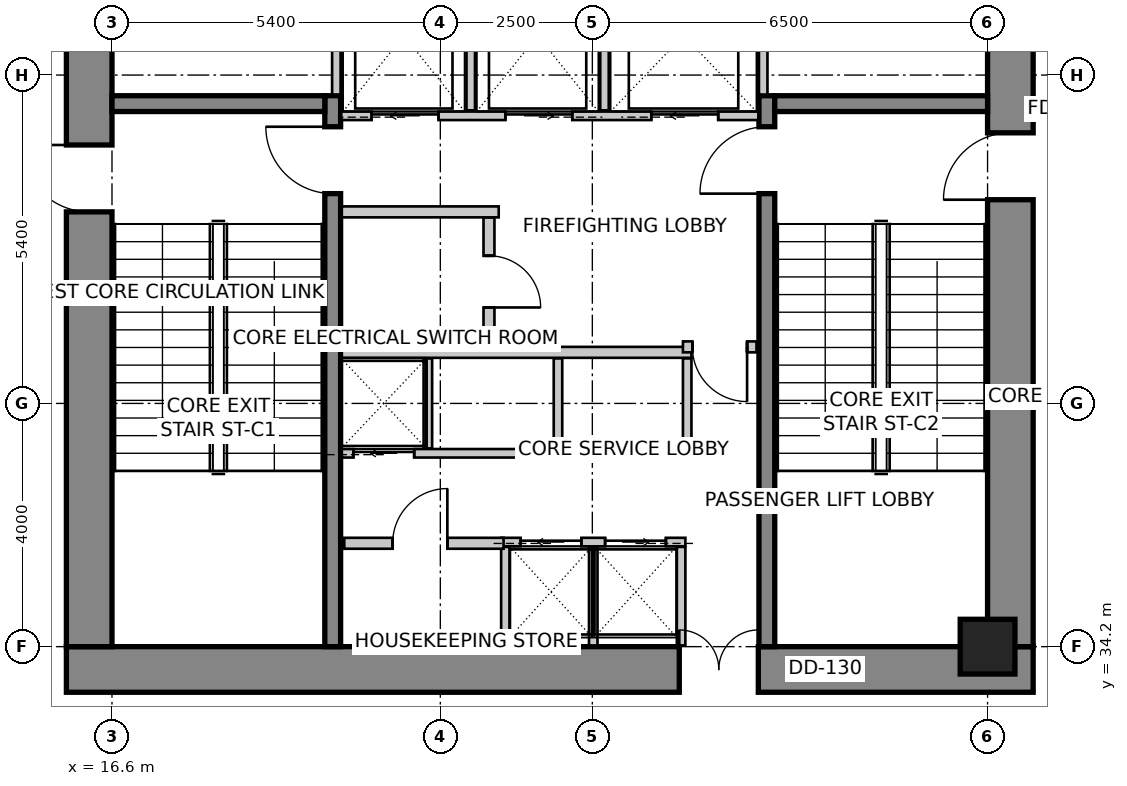
"""IFC4 building model, lengths in metres.
Left out: names, types, materials, properties, quantities, classifications, styles, units other than length and angle.
Written with IfcOpenShell. Run it as: python <this file> out.ifc"""

import sys

from ifc_helpers import new_model, si_unit, direction, frame, frame_2d, origin, origin_2d, place, context, subcontext, project, spatial, rectangle, extrude, source, transform, mapped, element, fill, save


model = new_model("IFC4")
c1 = context("Model", 3, precision=1e-05, world=origin(), true_north=direction((0.0, 1.0)))
c2 = subcontext(c1, "Body", "Model", "MODEL_VIEW")
j1 = project(units=[si_unit("LENGTHUNIT", "METRE"), si_unit("PLANEANGLEUNIT", "RADIAN")], contexts=[c1])
p1 = place(None, origin())
s1 = spatial("IfcSite", under=j1, at=p1, CompositionType="ELEMENT")
p2 = place(p1, origin())
s2 = spatial("IfcBuilding", under=s1, at=p2, CompositionType="ELEMENT")
p3 = place(p2, frame((0.0, 0.0, 105.4)))
s3 = spatial("IfcBuildingStorey", under=s2, at=p3, CompositionType="ELEMENT", Elevation=105.4)
p4 = place(p3, frame((15.85, 33.825, 0.0), z_axis=(0.0, 0.0, 1.0), x_axis=(1.0, 0.0, 0.0)))
e1 = element("IfcWall", 1, at=p4, inside=s3, PredefinedType="SHEAR", context=c2, shape_type="SweptSolid", body=[
    extrude(rectangle(XDim=15.9, YDim=0.75, at=frame_2d((7.95, 0.0))), origin(), (0.0, 0.0, 1.0), 5.2),
])
m1 = source(origin(), c2, "Body", "SweptSolid", [
    extrude(rectangle(XDim=1.3, YDim=2.15, at=frame_2d((0.65, 1.075))), frame((0.0, 0.385, 0.0), z_axis=(0.0, -1.0, 0.0), x_axis=(1.0, 0.0, 0.0)), (0.0, 0.0, 1.0), 0.77),
])
p5 = place(p4, frame((10.08, 0.0, 0.0)))
e2 = element("IfcOpeningElement", 2, at=p5, cuts=e1, PredefinedType="OPENING", context=c2, shape_type="MappedRepresentation", body=[
    mapped(m1, transform((0.0, 0.0, 0.0), scale=1.0)),
])
p6 = place(p3, frame((16.225, 34.2, 0.0), z_axis=(0.0, 0.0, 1.0), x_axis=(0.0, 1.0, 0.0)))
e3 = element("IfcWall", 3, at=p6, inside=s3, PredefinedType="SHEAR", context=c2, shape_type="SweptSolid", body=[
    extrude(rectangle(XDim=11.4, YDim=0.75, at=frame_2d((5.7, 0.0))), origin(), (0.0, 0.0, 1.0), 5.2),
])
m2 = source(origin(), c2, "Body", "SweptSolid", [
    extrude(rectangle(XDim=1.1, YDim=2.15, at=frame_2d((0.55, 1.075))), frame((0.0, 0.385, 0.0), z_axis=(0.0, -1.0, 0.0), x_axis=(1.0, 0.0, 0.0)), (0.0, 0.0, 1.0), 0.77),
])
p7 = place(p6, frame((7.15, 0.0, 0.0)))
e4 = element("IfcOpeningElement", 4, at=p7, cuts=e3, PredefinedType="OPENING", context=c2, shape_type="MappedRepresentation", body=[
    mapped(m2, transform((0.0, 0.0, 0.0), scale=1.0)),
])
p8 = place(p3, frame((31.375, 34.2, 0.0), z_axis=(0.0, 0.0, 1.0), x_axis=(0.0, 1.0, 0.0)))
e5 = element("IfcWall", 5, at=p8, inside=s3, PredefinedType="SHEAR", context=c2, shape_type="SweptSolid", body=[
    extrude(rectangle(XDim=11.4, YDim=0.75, at=frame_2d((5.7, 0.0))), origin(), (0.0, 0.0, 1.0), 5.2),
])
p9 = place(p8, frame((7.35, 0.0, 0.0)))
e6 = element("IfcOpeningElement", 6, at=p9, cuts=e5, PredefinedType="OPENING", context=c2, shape_type="MappedRepresentation", body=[
    mapped(m2, transform((0.0, 0.0, 0.0), scale=1.0)),
])
p10 = place(p3, frame((20.23, 34.2, 0.0), z_axis=(0.0, 0.0, 1.0), x_axis=(0.0, 1.0, 0.0)))
e7 = element("IfcWall", 7, at=p10, inside=s3, PredefinedType="SHEAR", context=c2, shape_type="SweptSolid", body=[
    extrude(rectangle(XDim=9.06, YDim=0.26, at=frame_2d((4.53, 0.0))), origin(), (0.0, 0.0, 1.0), 5.2),
])
m3 = source(origin(), c2, "Body", "SweptSolid", [
    extrude(rectangle(XDim=1.1, YDim=2.15, at=frame_2d((0.55, 1.075))), frame((0.0, 0.14, 0.0), z_axis=(0.0, -1.0, 0.0), x_axis=(1.0, 0.0, 0.0)), (0.0, 0.0, 1.0), 0.28),
])
p11 = place(p10, frame((7.45, 0.0, 0.0)))
e8 = element("IfcOpeningElement", 8, at=p11, cuts=e7, PredefinedType="OPENING", context=c2, shape_type="MappedRepresentation", body=[
    mapped(m3, transform((0.0, 0.0, 0.0), scale=1.0)),
])
p12 = place(p3, frame((27.37, 34.2, 0.0), z_axis=(0.0, 0.0, 1.0), x_axis=(0.0, 1.0, 0.0)))
e9 = element("IfcWall", 9, at=p12, inside=s3, PredefinedType="SHEAR", context=c2, shape_type="SweptSolid", body=[
    extrude(rectangle(XDim=9.06, YDim=0.26, at=frame_2d((4.53, 0.0))), origin(), (0.0, 0.0, 1.0), 5.2),
])
p13 = place(p12, frame((7.45, 0.0, 0.0)))
e10 = element("IfcOpeningElement", 10, at=p13, cuts=e9, PredefinedType="OPENING", context=c2, shape_type="MappedRepresentation", body=[
    mapped(m3, transform((0.0, 0.0, 0.0), scale=1.0)),
])
for number, where, z_axis, x_axis in (
    (11, (16.6, 43.13, 0.0), (0.0, 0.0, 1.0), (1.0, 0.0, 0.0)),
    (12, (27.5, 43.13, 0.0), (0.0, 0.0, 1.0), (1.0, 0.0, 0.0)),
):
    element("IfcWall", number, at=place(p3, frame(where, z_axis=z_axis, x_axis=x_axis)), inside=s3, PredefinedType="SHEAR", context=c2, shape_type="SweptSolid", body=[
        extrude(rectangle(XDim=3.5, YDim=0.26, at=frame_2d((1.75, 0.0))), origin(), (0.0, 0.0, 1.0), 5.2),
    ])
m4 = source(origin(), c2, "Body", "SweptSolid", [
    extrude(rectangle(XDim=0.9, YDim=0.9, at=origin_2d()), origin(), (0.0, 0.0, 1.0), 5.2),
])
p14 = place(p3, frame((31.0, 34.2, 0.0), z_axis=(0.0, 0.0, 1.0), x_axis=(1.0, 0.0, 0.0)))
e13 = element("IfcColumn", 13, at=p14, inside=s3, PredefinedType="COLUMN", context=c2, shape_type="MappedRepresentation", body=[
    mapped(m4, transform((0.0, 0.0, 0.0), scale=1.0)),
])
p15 = place(p3, frame((20.37, 42.93, 0.0), z_axis=(0.0, 0.0, 1.0), x_axis=(1.0, 0.0, 0.0)))
e14 = element("IfcWall", 14, at=p15, inside=s3, PredefinedType="SOLIDWALL", context=c2, shape_type="SweptSolid", body=[
    extrude(rectangle(XDim=6.86, YDim=0.14, at=frame_2d((3.43, 0.0))), origin(), (0.0, 0.0, 1.0), 4.95),
])
m5 = source(origin(), c2, "Body", "SweptSolid", [
    extrude(rectangle(XDim=1.1, YDim=2.15, at=frame_2d((0.55, 1.075))), frame((0.0, 0.08, 0.0), z_axis=(0.0, -1.0, 0.0), x_axis=(1.0, 0.0, 0.0)), (0.0, 0.0, 1.0), 0.16),
])
p16 = place(p15, frame((0.5, 0.0, 0.0)))
e15 = element("IfcOpeningElement", 15, at=p16, cuts=e14, PredefinedType="OPENING", context=c2, shape_type="MappedRepresentation", body=[
    mapped(m5, transform((0.0, 0.0, 0.0), scale=1.0)),
])
p17 = place(p15, frame((2.7, 0.0, 0.0)))
e16 = element("IfcOpeningElement", 16, at=p17, cuts=e14, PredefinedType="OPENING", context=c2, shape_type="MappedRepresentation", body=[
    mapped(m5, transform((0.0, 0.0, 0.0), scale=1.0)),
])
p18 = place(p15, frame((5.1, 0.0, 0.0)))
e17 = element("IfcOpeningElement", 17, at=p18, cuts=e14, PredefinedType="OPENING", context=c2, shape_type="MappedRepresentation", body=[
    mapped(m5, transform((0.0, 0.0, 0.0), scale=1.0)),
])
for number, where, z_axis, x_axis in (
    (18, (20.29, 43.28, 0.0), (0.0, 0.0, 1.0), (0.0, 1.0, 0.0)),
    (19, (27.31, 43.28, 0.0), (0.0, 0.0, 1.0), (0.0, 1.0, 0.0)),
):
    element("IfcWall", number, at=place(p3, frame(where, z_axis=z_axis, x_axis=x_axis)), inside=s3, PredefinedType="SOLIDWALL", context=c2, shape_type="SweptSolid", body=[
        extrude(rectangle(XDim=2.3, YDim=0.14, at=frame_2d((1.15, 0.0))), origin(), (0.0, 0.0, 1.0), 4.95),
    ])
for number, where, z_axis, x_axis in (
    (20, (22.5, 43.02, 0.0), (0.0, 0.0, 1.0), (0.0, 1.0, 0.0)),
    (21, (24.7, 43.02, 0.0), (0.0, 0.0, 1.0), (0.0, 1.0, 0.0)),
):
    element("IfcWall", number, at=place(p3, frame(where, z_axis=z_axis, x_axis=x_axis)), inside=s3, PredefinedType="SOLIDWALL", context=c2, shape_type="SweptSolid", body=[
        extrude(rectangle(XDim=2.56, YDim=0.14, at=frame_2d((1.28, 0.0))), origin(), (0.0, 0.0, 1.0), 4.95),
    ])
p19 = place(p3, frame((23.0, 35.92, 0.0), z_axis=(0.0, 0.0, 1.0), x_axis=(1.0, 0.0, 0.0)))
e22 = element("IfcWall", 22, at=p19, inside=s3, PredefinedType="SOLIDWALL", context=c2, shape_type="SweptSolid", body=[
    extrude(rectangle(XDim=3.03, YDim=0.14, at=frame_2d((1.515, 0.0))), origin(), (0.0, 0.0, 1.0), 4.95),
])
m6 = source(origin(), c2, "Body", "SweptSolid", [
    extrude(rectangle(XDim=1.0, YDim=2.15, at=frame_2d((0.5, 1.075))), frame((0.0, 0.08, 0.0), z_axis=(0.0, -1.0, 0.0), x_axis=(1.0, 0.0, 0.0)), (0.0, 0.0, 1.0), 0.16),
])
p20 = place(p19, frame((0.32, 0.0, 0.0)))
e23 = element("IfcOpeningElement", 23, at=p20, cuts=e22, PredefinedType="OPENING", context=c2, shape_type="MappedRepresentation", body=[
    mapped(m6, transform((0.0, 0.0, 0.0), scale=1.0)),
])
p21 = place(p19, frame((1.71, 0.0, 0.0)))
e24 = element("IfcOpeningElement", 24, at=p21, cuts=e22, PredefinedType="OPENING", context=c2, shape_type="MappedRepresentation", body=[
    mapped(m6, transform((0.0, 0.0, 0.0), scale=1.0)),
])
for number, where, z_axis, x_axis in (
    (25, (25.96, 34.22, 0.0), (0.0, 0.0, 1.0), (0.0, 1.0, 0.0)),
    (26, (23.07, 34.22, 0.0), (0.0, 0.0, 1.0), (0.0, 1.0, 0.0)),
    (27, (24.515, 34.22, 0.0), (0.0, 0.0, 1.0), (0.0, 1.0, 0.0)),
):
    element("IfcWall", number, at=place(p3, frame(where, z_axis=z_axis, x_axis=x_axis)), inside=s3, PredefinedType="SOLIDWALL", context=c2, shape_type="SweptSolid", body=[
        extrude(rectangle(XDim=1.62, YDim=0.14, at=frame_2d((0.81, 0.0))), origin(), (0.0, 0.0, 1.0), 4.242),
    ])
p22 = place(p3, frame((20.38, 37.38, 0.0), z_axis=(0.0, 0.0, 1.0), x_axis=(1.0, 0.0, 0.0)))
e28 = element("IfcWall", 28, at=p22, inside=s3, PredefinedType="SOLIDWALL", context=c2, shape_type="SweptSolid", body=[
    extrude(rectangle(XDim=5.75, YDim=0.14, at=frame_2d((2.875, 0.0))), origin(), (0.0, 0.0, 1.0), 4.95),
])
p23 = place(p22, frame((0.19, 0.0, 0.0)))
e29 = element("IfcOpeningElement", 29, at=p23, cuts=e28, PredefinedType="OPENING", context=c2, shape_type="MappedRepresentation", body=[
    mapped(m6, transform((0.0, 0.0, 0.0), scale=1.0)),
])
p24 = place(p3, frame((20.38, 39.04, 0.0), z_axis=(0.0, 0.0, 1.0), x_axis=(1.0, 0.0, 0.0)))
e30 = element("IfcWall", 30, at=p24, inside=s3, PredefinedType="SOLIDWALL", context=c2, shape_type="SweptSolid", body=[
    extrude(rectangle(XDim=5.75, YDim=0.18, at=frame_2d((2.875, 0.0))), origin(), (0.0, 0.0, 1.0), 4.95),
])
for number, where, z_axis, x_axis in (
    (31, (26.06, 37.46, 0.0), (0.0, 0.0, 1.0), (0.0, 1.0, 0.0)),
    (32, (21.795, 37.46, 0.0), (0.0, 0.0, 1.0), (0.0, 1.0, 0.0)),
    (33, (23.935, 37.46, 0.0), (0.0, 0.0, 1.0), (0.0, 1.0, 0.0)),
):
    element("IfcWall", number, at=place(p3, frame(where, z_axis=z_axis, x_axis=x_axis)), inside=s3, PredefinedType="SOLIDWALL", context=c2, shape_type="SweptSolid", body=[
        extrude(rectangle(XDim=1.48, YDim=0.14, at=frame_2d((0.74, 0.0))), origin(), (0.0, 0.0, 1.0), 4.95),
    ])
p25 = place(p3, frame((22.96, 41.35, 0.0), z_axis=(0.0, 0.0, 1.0), x_axis=(-1.0, 0.0, 0.0)))
e34 = element("IfcWall", 34, at=p25, inside=s3, PredefinedType="PARTITIONING", context=c2, shape_type="SweptSolid", body=[
    extrude(rectangle(XDim=2.58, YDim=0.18, at=frame_2d((1.29, 0.0))), origin(), (0.0, 0.0, 1.0), 4.95),
])
p26 = place(p3, frame((22.8, 41.256, 0.0), z_axis=(0.0, 0.0, 1.0), x_axis=(0.0, -1.0, 0.0)))
e35 = element("IfcWall", 35, at=p26, inside=s3, PredefinedType="PARTITIONING", context=c2, shape_type="SweptSolid", body=[
    extrude(rectangle(XDim=2.106, YDim=0.18, at=frame_2d((1.053, 0.0))), origin(), (0.0, 0.0, 1.0), 4.95),
])
m7 = source(origin(), c2, "Body", "SweptSolid", [
    extrude(rectangle(XDim=0.85, YDim=2.15, at=frame_2d((0.425, 1.075))), frame((0.0, 0.1, 0.0), z_axis=(0.0, -1.0, 0.0), x_axis=(1.0, 0.0, 0.0)), (0.0, 0.0, 1.0), 0.2),
])
p27 = place(p26, frame((0.628, 0.0, 0.0)))
e36 = element("IfcOpeningElement", 36, at=p27, cuts=e35, PredefinedType="OPENING", context=c2, shape_type="MappedRepresentation", body=[
    mapped(m7, transform((0.0, 0.0, 0.0), scale=1.0)),
])
p28 = place(p3, frame((27.2, 39.13, 0.0), z_axis=(0.0, 0.0, 1.0), x_axis=(-1.0, 0.0, 0.0)))
e37 = element("IfcWall", 37, at=p28, inside=s3, PredefinedType="PARTITIONING", context=c2, shape_type="SweptSolid", body=[
    extrude(rectangle(XDim=1.21, YDim=0.18, at=frame_2d((0.605, 0.0))), origin(), (0.0, 0.0, 1.0), 4.95),
])
m8 = source(origin(), c2, "Body", "SweptSolid", [
    extrude(rectangle(XDim=0.9, YDim=2.15, at=frame_2d((0.45, 1.075))), frame((0.0, 0.1, 0.0), z_axis=(0.0, -1.0, 0.0), x_axis=(1.0, 0.0, 0.0)), (0.0, 0.0, 1.0), 0.2),
])
p29 = place(p28, frame((0.155, 0.0, 0.0)))
e38 = element("IfcOpeningElement", 38, at=p29, cuts=e37, PredefinedType="OPENING", context=c2, shape_type="MappedRepresentation", body=[
    mapped(m8, transform((0.0, 0.0, 0.0), scale=1.0)),
])
p30 = place(p3, frame((20.42, 35.9, 0.0), z_axis=(0.0, 0.0, 1.0), x_axis=(1.0, 0.0, 0.0)))
e39 = element("IfcWall", 39, at=p30, inside=s3, PredefinedType="PARTITIONING", context=c2, shape_type="SweptSolid", body=[
    extrude(rectangle(XDim=2.62, YDim=0.18, at=frame_2d((1.31, 0.0))), origin(), (0.0, 0.0, 1.0), 4.95),
])
p31 = place(p30, frame((0.796, 0.0, 0.0)))
e40 = element("IfcOpeningElement", 40, at=p31, cuts=e39, PredefinedType="OPENING", context=c2, shape_type="MappedRepresentation", body=[
    mapped(m8, transform((0.0, 0.0, 0.0), scale=1.0)),
])
m9 = source(origin(), c2, "Body", "SweptSolid", [
    extrude(rectangle(XDim=1.1, YDim=2.15, at=frame_2d((0.55, 1.075))), frame((0.0, 0.025, 0.0), z_axis=(0.0, -1.0, 0.0), x_axis=(1.0, 0.0, 0.0)), (0.0, 0.0, 1.0), 0.05),
])
p32 = place(p16, origin())
e41 = element("IfcDoor", 41, at=p32, inside=s3, OperationType="SLIDING_TO_LEFT", PredefinedType="DOOR", context=c2, shape_type="MappedRepresentation", body=[
    mapped(m9, transform((0.0, 0.0, 0.0), scale=1.0)),
])
fill(e15, e41)
p33 = place(p17, origin())
e42 = element("IfcDoor", 42, at=p33, inside=s3, OperationType="SLIDING_TO_RIGHT", PredefinedType="DOOR", context=c2, shape_type="MappedRepresentation", body=[
    mapped(m9, transform((0.0, 0.0, 0.0), scale=1.0)),
])
fill(e16, e42)
m10 = source(origin(), c2, "Body", "SweptSolid", [
    extrude(rectangle(XDim=1.1, YDim=2.15, at=frame_2d((0.55, 1.075))), frame((0.0, 0.025, 0.0), z_axis=(0.0, -1.0, 0.0), x_axis=(1.0, 0.0, 0.0)), (0.0, 0.0, 1.0), 0.05),
])
p34 = place(p18, origin())
e43 = element("IfcDoor", 43, at=p34, inside=s3, OperationType="SLIDING_TO_LEFT", PredefinedType="DOOR", context=c2, shape_type="MappedRepresentation", body=[
    mapped(m10, transform((0.0, 0.0, 0.0), scale=1.0)),
])
fill(e17, e43)
m11 = source(origin(), c2, "Body", "SweptSolid", [
    extrude(rectangle(XDim=1.0, YDim=2.15, at=frame_2d((0.5, 1.075))), frame((0.0, 0.025, 0.0), z_axis=(0.0, -1.0, 0.0), x_axis=(1.0, 0.0, 0.0)), (0.0, 0.0, 1.0), 0.05),
])
p35 = place(p20, origin())
e44 = element("IfcDoor", 44, at=p35, inside=s3, OperationType="SLIDING_TO_LEFT", PredefinedType="DOOR", context=c2, shape_type="MappedRepresentation", body=[
    mapped(m11, transform((0.0, 0.0, 0.0), scale=1.0)),
])
fill(e23, e44)
p36 = place(p21, origin())
e45 = element("IfcDoor", 45, at=p36, inside=s3, OperationType="SLIDING_TO_RIGHT", PredefinedType="DOOR", context=c2, shape_type="MappedRepresentation", body=[
    mapped(m11, transform((0.0, 0.0, 0.0), scale=1.0)),
])
fill(e24, e45)
p37 = place(p23, origin())
e46 = element("IfcDoor", 46, at=p37, inside=s3, OperationType="SLIDING_TO_LEFT", PredefinedType="DOOR", context=c2, shape_type="MappedRepresentation", body=[
    mapped(m11, transform((0.0, 0.0, 0.0), scale=1.0)),
])
fill(e29, e46)
m12 = source(origin(), c2, "Body", "SweptSolid", [
    extrude(rectangle(XDim=1.1, YDim=2.15, at=frame_2d((0.55, 1.075))), frame((0.0, 0.025, 0.0), z_axis=(0.0, -1.0, 0.0), x_axis=(1.0, 0.0, 0.0)), (0.0, 0.0, 1.0), 0.05),
])
p38 = place(p11, origin())
e47 = element("IfcDoor", 47, at=p38, inside=s3, OperationType="SINGLE_SWING_RIGHT", PredefinedType="DOOR", context=c2, shape_type="MappedRepresentation", body=[
    mapped(m12, transform((0.0, 0.0, 0.0), scale=1.0)),
])
fill(e8, e47)
p39 = place(p13, origin())
e48 = element("IfcDoor", 48, at=p39, inside=s3, OperationType="SINGLE_SWING_LEFT", PredefinedType="DOOR", context=c2, shape_type="MappedRepresentation", body=[
    mapped(m12, transform((0.0, 0.0, 0.0), scale=1.0)),
])
fill(e10, e48)
p40 = place(p7, origin())
e49 = element("IfcDoor", 49, at=p40, inside=s3, OperationType="SINGLE_SWING_RIGHT", PredefinedType="DOOR", context=c2, shape_type="MappedRepresentation", body=[
    mapped(m12, transform((0.0, 0.0, 0.0), scale=1.0)),
])
fill(e4, e49)
p41 = place(p9, origin())
e50 = element("IfcDoor", 50, at=p41, inside=s3, OperationType="SINGLE_SWING_LEFT", PredefinedType="DOOR", context=c2, shape_type="MappedRepresentation", body=[
    mapped(m12, transform((0.0, 0.0, 0.0), scale=1.0)),
])
fill(e6, e50)
m13 = source(origin(), c2, "Body", "SweptSolid", [
    extrude(rectangle(XDim=1.3, YDim=2.15, at=frame_2d((0.65, 1.075))), frame((0.0, 0.025, 0.0), z_axis=(0.0, -1.0, 0.0), x_axis=(1.0, 0.0, 0.0)), (0.0, 0.0, 1.0), 0.05),
])
p42 = place(p5, origin())
e51 = element("IfcDoor", 51, at=p42, inside=s3, OperationType="DOUBLE_DOOR_SINGLE_SWING", PredefinedType="DOOR", context=c2, shape_type="MappedRepresentation", body=[
    mapped(m13, transform((0.0, 0.0, 0.0), scale=1.0)),
])
fill(e2, e51)
m14 = source(origin(), c2, "Body", "SweptSolid", [
    extrude(rectangle(XDim=0.85, YDim=2.15, at=frame_2d((0.425, 1.075))), frame((0.0, 0.025, 0.0), z_axis=(0.0, -1.0, 0.0), x_axis=(1.0, 0.0, 0.0)), (0.0, 0.0, 1.0), 0.05),
])
p43 = place(p27, origin())
e52 = element("IfcDoor", 52, at=p43, inside=s3, OperationType="SINGLE_SWING_RIGHT", PredefinedType="DOOR", context=c2, shape_type="MappedRepresentation", body=[
    mapped(m14, transform((0.0, 0.0, 0.0), scale=1.0)),
])
fill(e36, e52)
m15 = source(origin(), c2, "Body", "SweptSolid", [
    extrude(rectangle(XDim=0.9, YDim=2.15, at=frame_2d((0.45, 1.075))), frame((0.0, 0.025, 0.0), z_axis=(0.0, -1.0, 0.0), x_axis=(1.0, 0.0, 0.0)), (0.0, 0.0, 1.0), 0.05),
])
p44 = place(p29, origin())
e53 = element("IfcDoor", 53, at=p44, inside=s3, OperationType="SINGLE_SWING_LEFT", PredefinedType="DOOR", context=c2, shape_type="MappedRepresentation", body=[
    mapped(m15, transform((0.0, 0.0, 0.0), scale=1.0)),
])
fill(e38, e53)
p45 = place(p31, origin())
e54 = element("IfcDoor", 54, at=p45, inside=s3, OperationType="SINGLE_SWING_RIGHT", PredefinedType="DOOR", context=c2, shape_type="MappedRepresentation", body=[
    mapped(m15, transform((0.0, 0.0, 0.0), scale=1.0)),
])
fill(e40, e54)
save(model, sys.argv[1])
